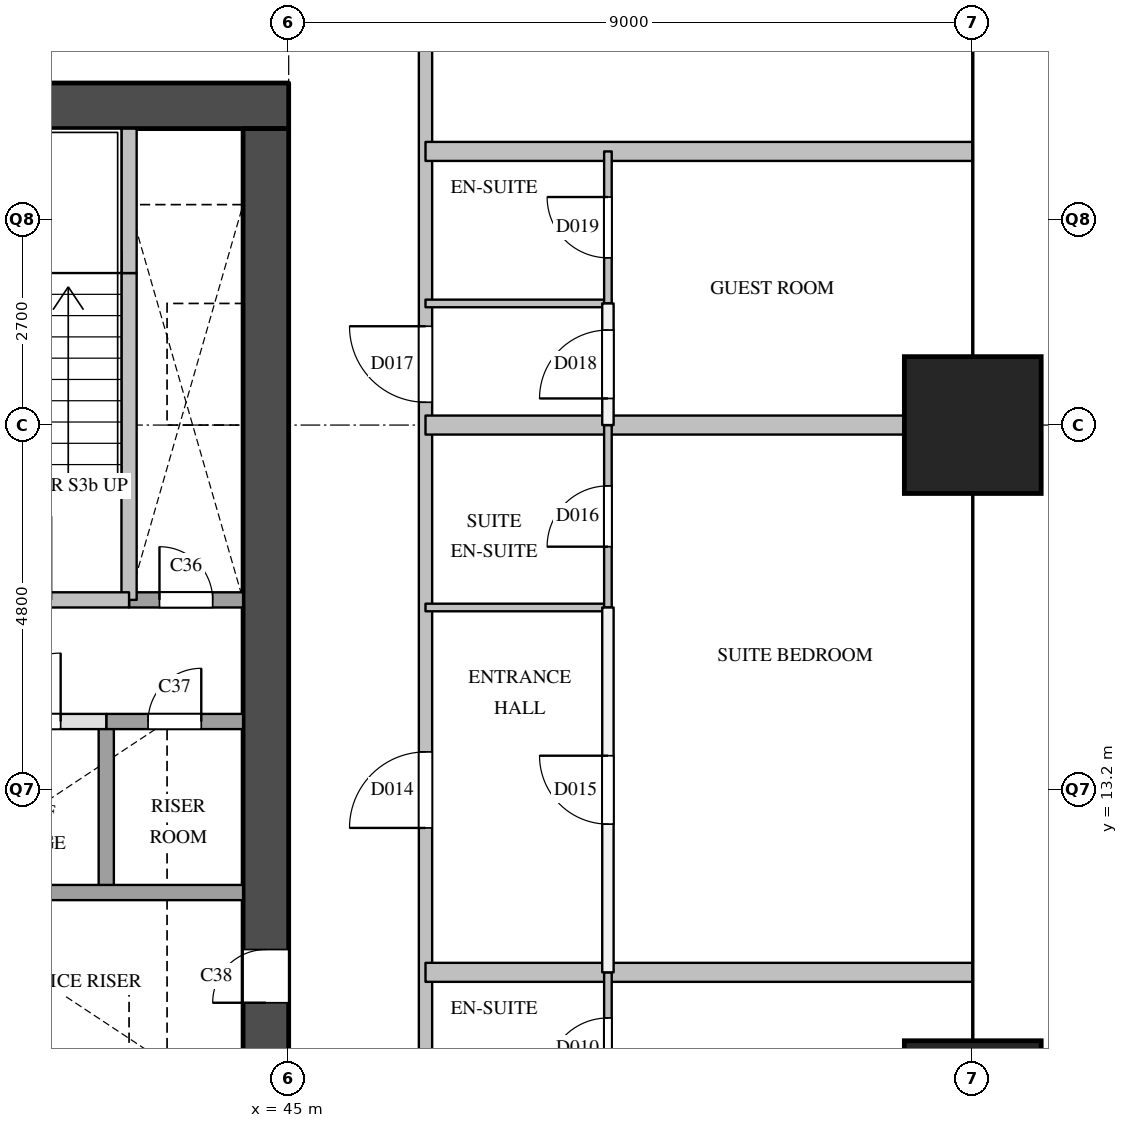
"""IFC4 building model, lengths in metres.
Left out: names, types, materials, properties, quantities, classifications, styles, units other than length and angle.
Written with IfcOpenShell. Run it as: python <this file> out.ifc"""

import sys

from ifc_helpers import new_model, si_unit, direction, frame, frame_2d, origin, origin_2d, place, context, subcontext, project, spatial, rectangle, extrude, element, fill, save


model = new_model("IFC4")
c1 = context("Model", 3, precision=1e-05, world=origin(), true_north=direction((0.0, 1.0)))
c2 = subcontext(c1, "Body", "Model", "MODEL_VIEW")
j1 = project(units=[si_unit("LENGTHUNIT", "METRE"), si_unit("PLANEANGLEUNIT", "RADIAN")], contexts=[c1])
p1 = place(None, origin())
s1 = spatial("IfcSite", under=j1, at=p1, CompositionType="ELEMENT")
p2 = place(p1, origin())
s2 = spatial("IfcBuilding", under=s1, at=p2, CompositionType="ELEMENT")
p3 = place(p2, frame((0.0, 0.0, 112.0)))
s3 = spatial("IfcBuildingStorey", under=s2, at=p3, CompositionType="ELEMENT", Elevation=112.0)
for number, where, z_axis, x_axis in (
    (1, (54.0, 9.0, 0.0), (0.0, 0.0, 1.0), (1.0, 0.0, 0.0)),
    (2, (54.0, 18.0, 0.0), (0.0, 0.0, 1.0), (1.0, 0.0, 0.0)),
):
    element("IfcColumn", number, at=place(p3, frame(where, z_axis=z_axis, x_axis=x_axis)), inside=s3, PredefinedType="COLUMN", context=c2, shape_type="SweptSolid", body=[
        extrude(rectangle(XDim=1.8, YDim=1.8, at=origin_2d()), origin(), (0.0, 0.0, 1.0), 3.8),
    ])
p4 = place(p3, frame((36.0, 22.2, 0.0), z_axis=(0.0, 0.0, 1.0), x_axis=(1.0, 0.0, 0.0)))
e3 = element("IfcWall", 3, at=p4, inside=s3, PredefinedType="SHEAR", context=c2, shape_type="SweptSolid", body=[
    extrude(rectangle(XDim=9.0, YDim=0.6, at=frame_2d((4.5, 0.0))), origin(), (0.0, 0.0, 1.0), 3.5),
])
p5 = place(p3, frame((44.7, 9.6, 0.0), z_axis=(0.0, 0.0, 1.0), x_axis=(0.0, 1.0, 0.0)))
e4 = element("IfcWall", 4, at=p5, inside=s3, PredefinedType="SHEAR", context=c2, shape_type="SweptSolid", body=[
    extrude(rectangle(XDim=12.3, YDim=0.6, at=frame_2d((6.15, 0.0))), origin(), (0.0, 0.0, 1.0), 3.5),
])
p6 = place(p5, frame((0.8, 0.0, 0.0)))
e5 = element("IfcOpeningElement", 5, at=p6, cuts=e4, PredefinedType="OPENING", context=c2, shape_type="SweptSolid", body=[
    extrude(rectangle(XDim=0.7, YDim=2.1, at=frame_2d((0.35, 1.05))), frame((0.0, 0.31, 0.0), z_axis=(0.0, -1.0, 0.0), x_axis=(1.0, 0.0, 0.0)), (0.0, 0.0, 1.0), 0.62),
])
p7 = place(p3, frame((42.6, 11.9, 0.0), z_axis=(0.0, 0.0, 1.0), x_axis=(0.0, 1.0, 0.0)))
e6 = element("IfcWall", 6, at=p7, inside=s3, PredefinedType="SOLIDWALL", context=c2, shape_type="SweptSolid", body=[
    extrude(rectangle(XDim=2.2, YDim=0.2, at=frame_2d((1.1, 0.0))), origin(), (0.0, 0.0, 1.0), 3.5),
])
p8 = place(p3, frame((42.9, 15.7, 0.0), z_axis=(0.0, 0.0, 1.0), x_axis=(0.0, 1.0, 0.0)))
e7 = element("IfcWall", 7, at=p8, inside=s3, PredefinedType="SOLIDWALL", context=c2, shape_type="SweptSolid", body=[
    extrude(rectangle(XDim=4.3, YDim=0.2, at=frame_2d((2.15, 0.0))), origin(), (0.0, 0.0, 1.0), 3.5),
])
p9 = place(p3, frame((42.9, 20.0, 0.0), z_axis=(0.0, 0.0, 1.0), x_axis=(0.0, 1.0, 0.0)))
e8 = element("IfcWall", 8, at=p9, inside=s3, PredefinedType="SOLIDWALL", context=c2, shape_type="SweptSolid", body=[
    extrude(rectangle(XDim=1.9, YDim=0.2, at=frame_2d((0.95, 0.0))), origin(), (0.0, 0.0, 1.0), 3.5),
])
p10 = place(p3, frame((36.6, 11.85, 0.0), z_axis=(0.0, 0.0, 1.0), x_axis=(1.0, 0.0, 0.0)))
e9 = element("IfcWall", 9, at=p10, inside=s3, PredefinedType="SOLIDWALL", context=c2, shape_type="SweptSolid", body=[
    extrude(rectangle(XDim=7.8, YDim=0.2, at=frame_2d((3.9, 0.0))), origin(), (0.0, 0.0, 1.0), 3.5),
])
p11 = place(p3, frame((36.6, 14.1, 0.0), z_axis=(0.0, 0.0, 1.0), x_axis=(1.0, 0.0, 0.0)))
e10 = element("IfcWall", 10, at=p11, inside=s3, PredefinedType="PARTITIONING", context=c2, shape_type="SweptSolid", body=[
    extrude(rectangle(XDim=6.0, YDim=0.2, at=frame_2d((3.0, 0.0))), origin(), (0.0, 0.0, 1.0), 3.5),
])
p12 = place(p11, frame((1.5, 0.0, 0.0)))
e11 = element("IfcOpeningElement", 11, at=p12, cuts=e10, PredefinedType="OPENING", context=c2, shape_type="SweptSolid", body=[
    extrude(rectangle(XDim=0.9, YDim=2.1, at=frame_2d((0.45, 1.05))), frame((0.0, 0.11, 0.0), z_axis=(0.0, -1.0, 0.0), x_axis=(1.0, 0.0, 0.0)), (0.0, 0.0, 1.0), 0.22),
])
p13 = place(p11, frame((4.5, 0.0, 0.0)))
e12 = element("IfcOpeningElement", 12, at=p13, cuts=e10, PredefinedType="OPENING", context=c2, shape_type="SweptSolid", body=[
    extrude(rectangle(XDim=0.9, YDim=2.1, at=frame_2d((0.45, 1.05))), frame((0.0, 0.11, 0.0), z_axis=(0.0, -1.0, 0.0), x_axis=(1.0, 0.0, 0.0)), (0.0, 0.0, 1.0), 0.22),
])
p14 = place(p3, frame((42.6, 14.1, 0.0), z_axis=(0.0, 0.0, 1.0), x_axis=(1.0, 0.0, 0.0)))
e13 = element("IfcWall", 13, at=p14, inside=s3, PredefinedType="SOLIDWALL", context=c2, shape_type="SweptSolid", body=[
    extrude(rectangle(XDim=1.8, YDim=0.2, at=frame_2d((0.9, 0.0))), origin(), (0.0, 0.0, 1.0), 3.5),
])
p15 = place(p14, frame((0.55, 0.0, 0.0)))
e14 = element("IfcOpeningElement", 14, at=p15, cuts=e13, PredefinedType="OPENING", context=c2, shape_type="SweptSolid", body=[
    extrude(rectangle(XDim=0.7, YDim=2.1, at=frame_2d((0.35, 1.05))), frame((0.0, 0.11, 0.0), z_axis=(0.0, -1.0, 0.0), x_axis=(1.0, 0.0, 0.0)), (0.0, 0.0, 1.0), 0.22),
])
p16 = place(p3, frame((42.9, 15.7, 0.0), z_axis=(0.0, 0.0, 1.0), x_axis=(1.0, 0.0, 0.0)))
e15 = element("IfcWall", 15, at=p16, inside=s3, PredefinedType="SOLIDWALL", context=c2, shape_type="SweptSolid", body=[
    extrude(rectangle(XDim=1.5, YDim=0.2, at=frame_2d((0.75, 0.0))), origin(), (0.0, 0.0, 1.0), 3.5),
])
p17 = place(p16, frame((0.4, 0.0, 0.0)))
e16 = element("IfcOpeningElement", 16, at=p17, cuts=e15, PredefinedType="OPENING", context=c2, shape_type="SweptSolid", body=[
    extrude(rectangle(XDim=0.7, YDim=2.1, at=frame_2d((0.35, 1.05))), frame((0.0, 0.11, 0.0), z_axis=(0.0, -1.0, 0.0), x_axis=(1.0, 0.0, 0.0)), (0.0, 0.0, 1.0), 0.22),
])
p18 = place(p3, frame((36.6, 15.7, 0.0), z_axis=(0.0, 0.0, 1.0), x_axis=(1.0, 0.0, 0.0)))
e17 = element("IfcWall", 17, at=p18, inside=s3, PredefinedType="SOLIDWALL", context=c2, shape_type="SweptSolid", body=[
    extrude(rectangle(XDim=6.3, YDim=0.2, at=frame_2d((3.15, 0.0))), origin(), (0.0, 0.0, 1.0), 3.5),
])
p19 = place(p18, frame((1.025, 0.0, 0.0)))
e18 = element("IfcOpeningElement", 18, at=p19, cuts=e17, PredefinedType="OPENING", context=c2, shape_type="SweptSolid", body=[
    extrude(rectangle(XDim=1.1, YDim=2.1, at=frame_2d((0.55, 1.05))), frame((0.0, 0.11, 0.0), z_axis=(0.0, -1.0, 0.0), x_axis=(1.0, 0.0, 0.0)), (0.0, 0.0, 1.0), 0.22),
])
p20 = place(p18, frame((4.175, 0.0, 0.0)))
e19 = element("IfcOpeningElement", 19, at=p20, cuts=e17, PredefinedType="OPENING", context=c2, shape_type="SweptSolid", body=[
    extrude(rectangle(XDim=1.1, YDim=2.1, at=frame_2d((0.55, 1.05))), frame((0.0, 0.11, 0.0), z_axis=(0.0, -1.0, 0.0), x_axis=(1.0, 0.0, 0.0)), (0.0, 0.0, 1.0), 0.22),
])
p21 = place(p3, frame((46.8, 7.2, 0.0), z_axis=(0.0, 0.0, 1.0), x_axis=(0.0, 1.0, 0.0)))
e20 = element("IfcWall", 20, at=p21, inside=s3, PredefinedType="PARTITIONING", context=c2, shape_type="SweptSolid", body=[
    extrude(rectangle(XDim=16.49, YDim=0.175, at=frame_2d((8.245, 0.0))), origin(), (0.0, 0.0, 1.0), 3.5),
])
p22 = place(p21, frame((0.3, 0.0, 0.0)))
e21 = element("IfcOpeningElement", 21, at=p22, cuts=e20, PredefinedType="OPENING", context=c2, shape_type="SweptSolid", body=[
    extrude(rectangle(XDim=1.0, YDim=2.1, at=frame_2d((0.5, 1.05))), frame((0.0, 0.097, 0.0), z_axis=(0.0, -1.0, 0.0), x_axis=(1.0, 0.0, 0.0)), (0.0, 0.0, 1.0), 0.195),
])
p23 = place(p21, frame((5.5, 0.0, 0.0)))
e22 = element("IfcOpeningElement", 22, at=p23, cuts=e20, PredefinedType="OPENING", context=c2, shape_type="SweptSolid", body=[
    extrude(rectangle(XDim=1.0, YDim=2.1, at=frame_2d((0.5, 1.05))), frame((0.0, 0.097, 0.0), z_axis=(0.0, -1.0, 0.0), x_axis=(1.0, 0.0, 0.0)), (0.0, 0.0, 1.0), 0.195),
])
p24 = place(p21, frame((11.1, 0.0, 0.0)))
e23 = element("IfcOpeningElement", 23, at=p24, cuts=e20, PredefinedType="OPENING", context=c2, shape_type="SweptSolid", body=[
    extrude(rectangle(XDim=1.0, YDim=2.1, at=frame_2d((0.5, 1.05))), frame((0.0, 0.097, 0.0), z_axis=(0.0, -1.0, 0.0), x_axis=(1.0, 0.0, 0.0)), (0.0, 0.0, 1.0), 0.195),
])
p25 = place(p3, frame((49.2, 10.8, 0.0), z_axis=(0.0, 0.0, 1.0), x_axis=(0.0, 1.0, 0.0)))
e24 = element("IfcWall", 24, at=p25, inside=s3, PredefinedType="PARTITIONING", context=c2, shape_type="SweptSolid", body=[
    extrude(rectangle(XDim=4.8, YDim=0.15, at=frame_2d((2.4, 0.0))), origin(), (0.0, 0.0, 1.0), 3.5),
])
p26 = place(p25, frame((1.95, 0.0, 0.0)))
e25 = element("IfcOpeningElement", 25, at=p26, cuts=e24, PredefinedType="OPENING", context=c2, shape_type="SweptSolid", body=[
    extrude(rectangle(XDim=0.9, YDim=2.1, at=frame_2d((0.45, 1.05))), frame((0.0, 0.085, 0.0), z_axis=(0.0, -1.0, 0.0), x_axis=(1.0, 0.0, 0.0)), (0.0, 0.0, 1.0), 0.17),
])
p27 = place(p3, frame((49.2, 18.0, 0.0), z_axis=(0.0, 0.0, 1.0), x_axis=(0.0, 1.0, 0.0)))
e26 = element("IfcWall", 26, at=p27, inside=s3, PredefinedType="PARTITIONING", context=c2, shape_type="SweptSolid", body=[
    extrude(rectangle(XDim=1.6, YDim=0.15, at=frame_2d((0.8, 0.0))), origin(), (0.0, 0.0, 1.0), 3.5),
])
p28 = place(p27, frame((0.35, 0.0, 0.0)))
e27 = element("IfcOpeningElement", 27, at=p28, cuts=e26, PredefinedType="OPENING", context=c2, shape_type="SweptSolid", body=[
    extrude(rectangle(XDim=0.9, YDim=2.1, at=frame_2d((0.45, 1.05))), frame((0.0, 0.085, 0.0), z_axis=(0.0, -1.0, 0.0), x_axis=(1.0, 0.0, 0.0)), (0.0, 0.0, 1.0), 0.17),
])
p29 = place(p3, frame((46.8, 10.8, 0.0), z_axis=(0.0, 0.0, 1.0), x_axis=(1.0, 0.0, 0.0)))
e28 = element("IfcWall", 28, at=p29, inside=s3, PredefinedType="PARTITIONING", context=c2, shape_type="SweptSolid", body=[
    extrude(rectangle(XDim=7.2, YDim=0.25, at=frame_2d((3.6, 0.0))), origin(), (0.0, 0.0, 1.0), 2.5),
])
p30 = place(p3, frame((46.8, 18.0, 0.0), z_axis=(0.0, 0.0, 1.0), x_axis=(1.0, 0.0, 0.0)))
e29 = element("IfcWall", 29, at=p30, inside=s3, PredefinedType="PARTITIONING", context=c2, shape_type="SweptSolid", body=[
    extrude(rectangle(XDim=7.2, YDim=0.25, at=frame_2d((3.6, 0.0))), origin(), (0.0, 0.0, 1.0), 3.5),
])
p31 = place(p3, frame((46.8, 21.6, 0.0), z_axis=(0.0, 0.0, 1.0), x_axis=(1.0, 0.0, 0.0)))
e30 = element("IfcWall", 30, at=p31, inside=s3, PredefinedType="PARTITIONING", context=c2, shape_type="SweptSolid", body=[
    extrude(rectangle(XDim=7.2, YDim=0.25, at=frame_2d((3.6, 0.0))), origin(), (0.0, 0.0, 1.0), 2.5),
])
for number, where, z_axis, x_axis in (
    (31, (46.8, 15.6, 0.0), (0.0, 0.0, 1.0), (1.0, 0.0, 0.0)),
    (32, (46.8, 19.6, 0.0), (0.0, 0.0, 1.0), (1.0, 0.0, 0.0)),
):
    element("IfcWall", number, at=place(p3, frame(where, z_axis=z_axis, x_axis=x_axis)), inside=s3, PredefinedType="PARTITIONING", context=c2, shape_type="SweptSolid", body=[
        extrude(rectangle(XDim=2.4, YDim=0.1, at=frame_2d((1.2, 0.0))), origin(), (0.0, 0.0, 1.0), 3.5),
    ])
p32 = place(p3, frame((49.2, 8.8, 0.0), z_axis=(0.0, 0.0, 1.0), x_axis=(0.0, 1.0, 0.0)))
e33 = element("IfcWall", 33, at=p32, inside=s3, PredefinedType="PARTITIONING", context=c2, shape_type="SweptSolid", body=[
    extrude(rectangle(XDim=2.0, YDim=0.1, at=frame_2d((1.0, 0.0))), origin(), (0.0, 0.0, 1.0), 3.5),
])
p33 = place(p32, frame((0.6, 0.0, 0.0)))
e34 = element("IfcOpeningElement", 34, at=p33, cuts=e33, PredefinedType="OPENING", context=c2, shape_type="SweptSolid", body=[
    extrude(rectangle(XDim=0.8, YDim=2.1, at=frame_2d((0.4, 1.05))), frame((0.0, 0.06, 0.0), z_axis=(0.0, -1.0, 0.0), x_axis=(1.0, 0.0, 0.0)), (0.0, 0.0, 1.0), 0.12),
])
p34 = place(p3, frame((49.2, 15.6, 0.0), z_axis=(0.0, 0.0, 1.0), x_axis=(0.0, 1.0, 0.0)))
e35 = element("IfcWall", 35, at=p34, inside=s3, PredefinedType="PARTITIONING", context=c2, shape_type="SweptSolid", body=[
    extrude(rectangle(XDim=2.4, YDim=0.1, at=frame_2d((1.2, 0.0))), origin(), (0.0, 0.0, 1.0), 3.5),
])
p35 = place(p34, frame((0.8, 0.0, 0.0)))
e36 = element("IfcOpeningElement", 36, at=p35, cuts=e35, PredefinedType="OPENING", context=c2, shape_type="SweptSolid", body=[
    extrude(rectangle(XDim=0.8, YDim=2.1, at=frame_2d((0.4, 1.05))), frame((0.0, 0.06, 0.0), z_axis=(0.0, -1.0, 0.0), x_axis=(1.0, 0.0, 0.0)), (0.0, 0.0, 1.0), 0.12),
])
p36 = place(p3, frame((49.2, 19.6, 0.0), z_axis=(0.0, 0.0, 1.0), x_axis=(0.0, 1.0, 0.0)))
e37 = element("IfcWall", 37, at=p36, inside=s3, PredefinedType="PARTITIONING", context=c2, shape_type="SweptSolid", body=[
    extrude(rectangle(XDim=2.0, YDim=0.1, at=frame_2d((1.0, 0.0))), origin(), (0.0, 0.0, 1.0), 3.5),
])
p37 = place(p36, frame((0.6, 0.0, 0.0)))
e38 = element("IfcOpeningElement", 38, at=p37, cuts=e37, PredefinedType="OPENING", context=c2, shape_type="SweptSolid", body=[
    extrude(rectangle(XDim=0.8, YDim=2.1, at=frame_2d((0.4, 1.05))), frame((0.0, 0.06, 0.0), z_axis=(0.0, -1.0, 0.0), x_axis=(1.0, 0.0, 0.0)), (0.0, 0.0, 1.0), 0.12),
])
p38 = place(p17, origin())
e39 = element("IfcDoor", 39, at=p38, inside=s3, OperationType="SINGLE_SWING_LEFT", PredefinedType="DOOR", context=c2, shape_type="SweptSolid", body=[
    extrude(rectangle(XDim=0.7, YDim=2.1, at=frame_2d((0.35, 1.05))), frame((0.0, 0.025, 0.0), z_axis=(0.0, -1.0, 0.0), x_axis=(1.0, 0.0, 0.0)), (0.0, 0.0, 1.0), 0.05),
])
fill(e16, e39)
p39 = place(p15, origin())
e40 = element("IfcDoor", 40, at=p39, inside=s3, OperationType="SINGLE_SWING_RIGHT", PredefinedType="DOOR", context=c2, shape_type="SweptSolid", body=[
    extrude(rectangle(XDim=0.7, YDim=2.1, at=frame_2d((0.35, 1.05))), frame((0.0, 0.025, 0.0), z_axis=(0.0, -1.0, 0.0), x_axis=(1.0, 0.0, 0.0)), (0.0, 0.0, 1.0), 0.05),
])
fill(e14, e40)
p40 = place(p6, origin())
e41 = element("IfcDoor", 41, at=p40, inside=s3, OperationType="SINGLE_SWING_LEFT", PredefinedType="DOOR", context=c2, shape_type="SweptSolid", body=[
    extrude(rectangle(XDim=0.7, YDim=2.1, at=frame_2d((0.35, 1.05))), frame((0.0, 0.025, 0.0), z_axis=(0.0, -1.0, 0.0), x_axis=(1.0, 0.0, 0.0)), (0.0, 0.0, 1.0), 0.05),
])
fill(e5, e41)
p41 = place(p13, origin())
e42 = element("IfcDoor", 42, at=p41, inside=s3, OperationType="SINGLE_SWING_RIGHT", PredefinedType="DOOR", context=c2, shape_type="SweptSolid", body=[
    extrude(rectangle(XDim=0.9, YDim=2.1, at=frame_2d((0.45, 1.05))), frame((0.0, 0.025, 0.0), z_axis=(0.0, -1.0, 0.0), x_axis=(1.0, 0.0, 0.0)), (0.0, 0.0, 1.0), 0.05),
])
fill(e12, e42)
p42 = place(p33, origin())
e43 = element("IfcDoor", 43, at=p42, inside=s3, OperationType="SINGLE_SWING_LEFT", PredefinedType="DOOR", context=c2, shape_type="SweptSolid", body=[
    extrude(rectangle(XDim=0.8, YDim=2.1, at=frame_2d((0.4, 1.05))), frame((0.0, 0.025, 0.0), z_axis=(0.0, -1.0, 0.0), x_axis=(1.0, 0.0, 0.0)), (0.0, 0.0, 1.0), 0.05),
])
fill(e34, e43)
p43 = place(p23, origin())
e44 = element("IfcDoor", 44, at=p43, inside=s3, OperationType="SINGLE_SWING_LEFT", PredefinedType="DOOR", context=c2, shape_type="SweptSolid", body=[
    extrude(rectangle(XDim=1.0, YDim=2.1, at=frame_2d((0.5, 1.05))), frame((0.0, 0.025, 0.0), z_axis=(0.0, -1.0, 0.0), x_axis=(1.0, 0.0, 0.0)), (0.0, 0.0, 1.0), 0.05),
])
fill(e22, e44)
p44 = place(p26, origin())
e45 = element("IfcDoor", 45, at=p44, inside=s3, OperationType="SINGLE_SWING_RIGHT", PredefinedType="DOOR", context=c2, shape_type="SweptSolid", body=[
    extrude(rectangle(XDim=0.9, YDim=2.1, at=frame_2d((0.45, 1.05))), frame((0.0, 0.025, 0.0), z_axis=(0.0, -1.0, 0.0), x_axis=(1.0, 0.0, 0.0)), (0.0, 0.0, 1.0), 0.05),
])
fill(e25, e45)
p45 = place(p35, origin())
e46 = element("IfcDoor", 46, at=p45, inside=s3, OperationType="SINGLE_SWING_LEFT", PredefinedType="DOOR", context=c2, shape_type="SweptSolid", body=[
    extrude(rectangle(XDim=0.8, YDim=2.1, at=frame_2d((0.4, 1.05))), frame((0.0, 0.025, 0.0), z_axis=(0.0, -1.0, 0.0), x_axis=(1.0, 0.0, 0.0)), (0.0, 0.0, 1.0), 0.05),
])
fill(e36, e46)
p46 = place(p24, origin())
e47 = element("IfcDoor", 47, at=p46, inside=s3, OperationType="SINGLE_SWING_RIGHT", PredefinedType="DOOR", context=c2, shape_type="SweptSolid", body=[
    extrude(rectangle(XDim=1.0, YDim=2.1, at=frame_2d((0.5, 1.05))), frame((0.0, 0.025, 0.0), z_axis=(0.0, -1.0, 0.0), x_axis=(1.0, 0.0, 0.0)), (0.0, 0.0, 1.0), 0.05),
])
fill(e23, e47)
p47 = place(p28, origin())
e48 = element("IfcDoor", 48, at=p47, inside=s3, OperationType="SINGLE_SWING_LEFT", PredefinedType="DOOR", context=c2, shape_type="SweptSolid", body=[
    extrude(rectangle(XDim=0.9, YDim=2.1, at=frame_2d((0.45, 1.05))), frame((0.0, 0.025, 0.0), z_axis=(0.0, -1.0, 0.0), x_axis=(1.0, 0.0, 0.0)), (0.0, 0.0, 1.0), 0.05),
])
fill(e27, e48)
p48 = place(p37, origin())
e49 = element("IfcDoor", 49, at=p48, inside=s3, OperationType="SINGLE_SWING_RIGHT", PredefinedType="DOOR", context=c2, shape_type="SweptSolid", body=[
    extrude(rectangle(XDim=0.8, YDim=2.1, at=frame_2d((0.4, 1.05))), frame((0.0, 0.025, 0.0), z_axis=(0.0, -1.0, 0.0), x_axis=(1.0, 0.0, 0.0)), (0.0, 0.0, 1.0), 0.05),
])
fill(e38, e49)
save(model, sys.argv[1])
